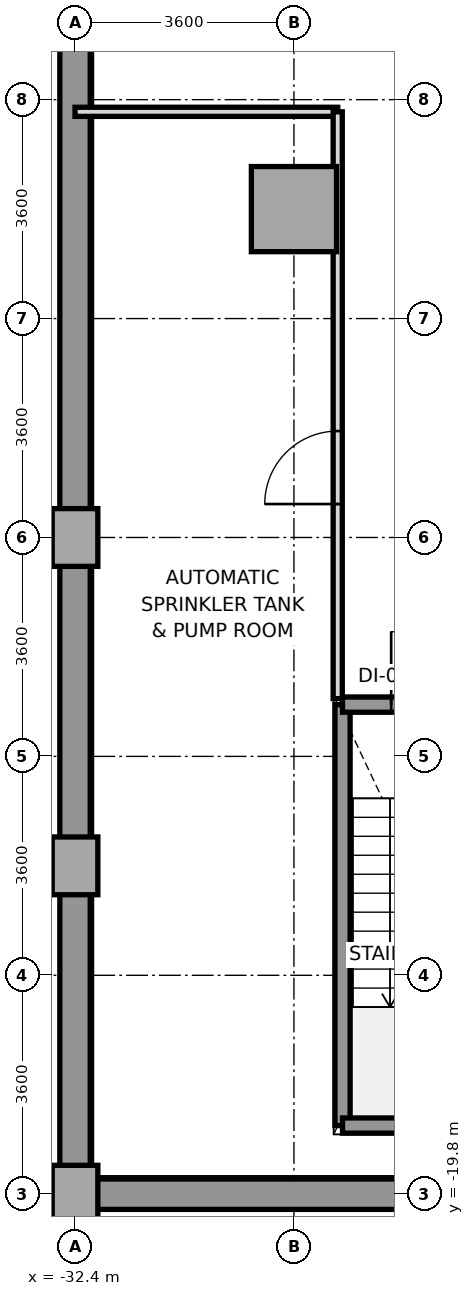
"""IFC4 building model, lengths in metres.
Left out: names, types, materials, properties, quantities, classifications, styles, units other than length and angle.
Written with IfcOpenShell. Run it as: python <this file> out.ifc"""

import sys

from ifc_helpers import new_model, si_unit, direction, frame, frame_2d, origin, origin_2d, place, context, subcontext, project, spatial, rectangle, extrude, source, transform, mapped, element, fill, save


model = new_model("IFC4")
c1 = context("Model", 3, precision=1e-05, world=origin(), true_north=direction((0.0, 1.0)))
c2 = subcontext(c1, "Body", "Model", "MODEL_VIEW")
j1 = project(units=[si_unit("LENGTHUNIT", "METRE"), si_unit("PLANEANGLEUNIT", "RADIAN")], contexts=[c1])
p1 = place(None, origin())
s1 = spatial("IfcSite", under=j1, at=p1, CompositionType="ELEMENT")
p2 = place(p1, origin())
s2 = spatial("IfcBuilding", under=s1, at=p2, CompositionType="ELEMENT")
p3 = place(p2, frame((0.0, 0.0, -8.4)))
s3 = spatial("IfcBuildingStorey", under=s2, at=p3, CompositionType="ELEMENT", Elevation=-8.4)
m1 = source(origin(), c2, "Body", "SweptSolid", [
    extrude(rectangle(XDim=0.75, YDim=0.95, at=origin_2d()), origin(), (0.0, 0.0, 1.0), 4.12),
])
for number, where, z_axis, x_axis in (
    (1, (-32.4, -19.8, -0.2), (0.0, 0.0, 1.0), (1.0, 0.0, 0.0)),
    (2, (-32.4, -14.4, -0.2), (0.0, 0.0, 1.0), (1.0, 0.0, 0.0)),
    (3, (-32.4, -9.0, -0.2), (0.0, 0.0, 1.0), (1.0, 0.0, 0.0)),
):
    element("IfcColumn", number, at=place(p3, frame(where, z_axis=z_axis, x_axis=x_axis)), inside=s3, PredefinedType="COLUMN", context=c2, shape_type="MappedRepresentation", body=[
        mapped(m1, transform((0.0, 0.0, 0.0), x_axis=(1.0, 0.0, 0.0), y_axis=(0.0, 1.0, 0.0), z_axis=(0.0, 0.0, 1.0), scale=1.0)),
    ])
m2 = source(origin(), c2, "Body", "SweptSolid", [
    extrude(rectangle(XDim=1.4, YDim=1.4, at=origin_2d()), origin(), (0.0, 0.0, 1.0), 4.12),
])
p4 = place(p3, frame((-28.8, -3.6, -0.2), z_axis=(0.0, 0.0, 1.0), x_axis=(1.0, 0.0, 0.0)))
e4 = element("IfcColumn", 4, at=p4, inside=s3, PredefinedType="COLUMN", context=c2, shape_type="MappedRepresentation", body=[
    mapped(m2, transform((0.0, 0.0, 0.0), x_axis=(1.0, 0.0, 0.0), y_axis=(0.0, 1.0, 0.0), z_axis=(0.0, 0.0, 1.0), scale=1.0)),
])
p5 = place(p3, frame((-32.4, -19.8, -0.2), z_axis=(0.0, 0.0, 1.0), x_axis=(1.0, 0.0, 0.0)))
e5 = element("IfcWall", 5, at=p5, inside=s3, PredefinedType="USERDEFINED", context=c2, shape_type="SweptSolid", body=[
    extrude(rectangle(XDim=64.8, YDim=0.5, at=frame_2d((32.4, 0.0))), origin(), (0.0, 0.0, 1.0), 4.12),
])
p6 = place(p3, frame((-32.4, 23.4, -0.2), z_axis=(0.0, 0.0, 1.0), x_axis=(0.0, -1.0, 0.0)))
e6 = element("IfcWall", 6, at=p6, inside=s3, PredefinedType="USERDEFINED", context=c2, shape_type="SweptSolid", body=[
    extrude(rectangle(XDim=43.2, YDim=0.5, at=frame_2d((21.6, 0.0))), origin(), (0.0, 0.0, 1.0), 4.12),
])
p7 = place(p3, frame((-28.001, -18.671, -0.2), z_axis=(0.0, 0.0, 1.0), x_axis=(0.0, 1.0, 0.0)))
e7 = element("IfcWall", 7, at=p7, inside=s3, PredefinedType="SOLIDWALL", context=c2, shape_type="SweptSolid", body=[
    extrude(rectangle(XDim=6.922, YDim=0.25, at=frame_2d((3.461, 0.0))), origin(), (0.0, 0.0, 1.0), 4.12),
])
p8 = place(p3, frame((-28.001, -18.671, -0.2), z_axis=(0.0, 0.0, 1.0), x_axis=(1.0, 0.0, 0.0)))
e8 = element("IfcWall", 8, at=p8, inside=s3, PredefinedType="SOLIDWALL", context=c2, shape_type="SweptSolid", body=[
    extrude(rectangle(XDim=3.122, YDim=0.25, at=frame_2d((1.561, 0.0))), origin(), (0.0, 0.0, 1.0), 4.12),
])
p9 = place(p3, frame((-28.001, -11.749, -0.2), z_axis=(0.0, 0.0, 1.0), x_axis=(1.0, 0.0, 0.0)))
e9 = element("IfcWall", 9, at=p9, inside=s3, PredefinedType="SOLIDWALL", context=c2, shape_type="SweptSolid", body=[
    extrude(rectangle(XDim=3.122, YDim=0.25, at=frame_2d((1.561, 0.0))), origin(), (0.0, 0.0, 1.0), 4.12),
])
p10 = place(p9, frame((0.8, 0.0, 0.2)))
e10 = element("IfcOpeningElement", 10, at=p10, cuts=e9, PredefinedType="OPENING", context=c2, shape_type="SweptSolid", body=[
    extrude(rectangle(XDim=1.2, YDim=2.2, at=frame_2d((0.6, 1.1))), frame((0.0, 0.135, 0.0), z_axis=(0.0, -1.0, 0.0), x_axis=(1.0, 0.0, 0.0)), (0.0, 0.0, 1.0), 0.27),
])
p11 = place(p3, frame((-32.4, -2.0, 0.0), z_axis=(0.0, 0.0, 1.0), x_axis=(1.0, 0.0, 0.0)))
e11 = element("IfcWall", 11, at=p11, inside=s3, PredefinedType="PARTITIONING", context=c2, shape_type="SweptSolid", body=[
    extrude(rectangle(XDim=4.32, YDim=0.15, at=frame_2d((2.16, 0.0))), origin(), (0.0, 0.0, 1.0), 3.33),
])
p12 = place(p3, frame((-28.08, -11.65, 0.0), z_axis=(0.0, 0.0, 1.0), x_axis=(0.0, 1.0, 0.0)))
e12 = element("IfcWall", 12, at=p12, inside=s3, PredefinedType="PARTITIONING", context=c2, shape_type="SweptSolid", body=[
    extrude(rectangle(XDim=9.65, YDim=0.15, at=frame_2d((4.825, 0.0))), origin(), (0.0, 0.0, 1.0), 3.27),
])
p13 = place(p12, frame((3.2, 0.0, 0.0)))
e13 = element("IfcOpeningElement", 13, at=p13, cuts=e12, PredefinedType="OPENING", context=c2, shape_type="SweptSolid", body=[
    extrude(rectangle(XDim=1.2, YDim=2.2, at=frame_2d((0.6, 1.1))), frame((0.0, 0.085, 0.0), z_axis=(0.0, -1.0, 0.0), x_axis=(1.0, 0.0, 0.0)), (0.0, 0.0, 1.0), 0.17),
])
m3 = source(origin(), c2, "Body", "SweptSolid", [
    extrude(rectangle(XDim=1.2, YDim=2.2, at=frame_2d((0.6, 1.1))), frame((0.0, 0.025, 0.0), z_axis=(0.0, -1.0, 0.0), x_axis=(1.0, 0.0, 0.0)), (0.0, 0.0, 1.0), 0.05),
])
p14 = place(p10, origin())
e14 = element("IfcDoor", 14, at=p14, inside=s3, OperationType="SINGLE_SWING_LEFT", PredefinedType="DOOR", context=c2, shape_type="MappedRepresentation", body=[
    mapped(m3, transform((0.0, 0.0, 0.0), x_axis=(1.0, 0.0, 0.0), y_axis=(0.0, 1.0, 0.0), z_axis=(0.0, 0.0, 1.0), scale=1.0)),
])
fill(e10, e14)
p15 = place(p13, origin())
e15 = element("IfcDoor", 15, at=p15, inside=s3, OperationType="SINGLE_SWING_LEFT", PredefinedType="DOOR", context=c2, shape_type="MappedRepresentation", body=[
    mapped(m3, transform((0.0, 0.0, 0.0), x_axis=(1.0, 0.0, 0.0), y_axis=(0.0, 1.0, 0.0), z_axis=(0.0, 0.0, 1.0), scale=1.0)),
])
fill(e13, e15)
save(model, sys.argv[1])
